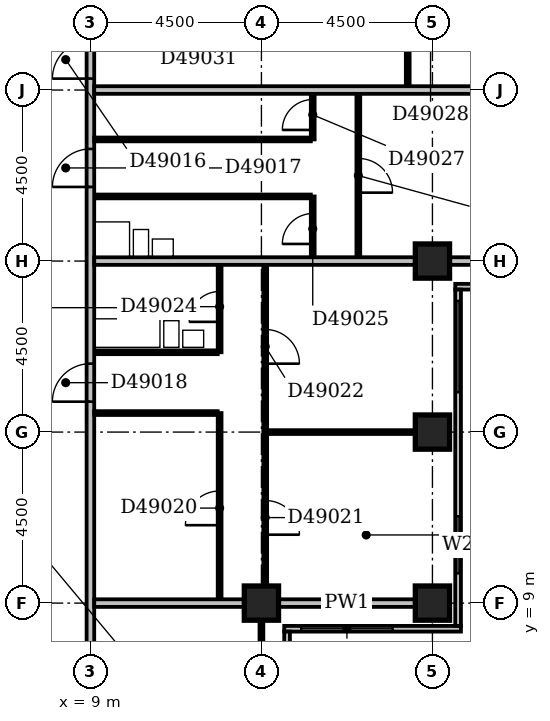
"""IFC4 building model, lengths in metres.
Left out: names, types, materials, properties, quantities, classifications, styles, units other than length and angle.
Written with IfcOpenShell. Run it as: python <this file> out.ifc"""

import sys

from ifc_helpers import new_model, si_unit, direction, frame, frame_2d, origin, origin_2d, place, context, subcontext, project, spatial, rectangle, extrude, element, fill, save


model = new_model("IFC4")
c1 = context("Model", 3, precision=1e-05, world=origin(), true_north=direction((0.0, 1.0)))
c2 = subcontext(c1, "Body", "Model", "MODEL_VIEW")
j1 = project(units=[si_unit("LENGTHUNIT", "METRE"), si_unit("PLANEANGLEUNIT", "RADIAN")], contexts=[c1])
p1 = place(None, origin())
s1 = spatial("IfcSite", under=j1, at=p1, CompositionType="ELEMENT")
p2 = place(p1, origin())
s2 = spatial("IfcBuilding", under=s1, at=p2, CompositionType="ELEMENT")
p3 = place(p2, frame((0.0, 0.0, 193.4)))
s3 = spatial("IfcBuildingStorey", under=s2, at=p3, CompositionType="ELEMENT", Elevation=193.4)
for number, where, z_axis, x_axis in (
    (1, (13.5, 9.0, -0.3), (0.0, 0.0, 1.0), (1.0, 0.0, 0.0)),
    (2, (18.0, 9.0, -0.3), (0.0, 0.0, 1.0), (1.0, 0.0, 0.0)),
    (3, (18.0, 13.5, -0.3), (0.0, 0.0, 1.0), (1.0, 0.0, 0.0)),
    (4, (18.0, 18.0, -0.3), (0.0, 0.0, 1.0), (1.0, 0.0, 0.0)),
):
    element("IfcColumn", number, at=place(p3, frame(where, z_axis=z_axis, x_axis=x_axis)), inside=s3, PredefinedType="COLUMN", context=c2, shape_type="SweptSolid", body=[
        extrude(rectangle(XDim=0.9, YDim=0.9, at=origin_2d()), origin(), (0.0, 0.0, 1.0), 3.6),
    ])
p4 = place(p3, frame((14.175, 3.9, 0.0), z_axis=(0.0, 0.0, 1.0), x_axis=(0.0, 1.0, 0.0)))
e5 = element("IfcWall", 5, at=p4, inside=s3, PredefinedType="STANDARD", context=c2, shape_type="SweptSolid", body=[
    extrude(rectangle(XDim=4.35, YDim=0.15, at=frame_2d((2.175, 0.0))), origin(), (0.0, 0.0, 1.0), 2.7),
])
p5 = place(p4, frame((1.65, 0.0, 0.6)))
e6 = element("IfcOpeningElement", 6, at=p5, cuts=e5, PredefinedType="OPENING", context=c2, shape_type="SweptSolid", body=[
    extrude(rectangle(XDim=2.4, YDim=1.8, at=frame_2d((1.2, 0.9))), frame((0.0, 0.087, 0.0), z_axis=(0.0, -1.0, 0.0), x_axis=(1.0, 0.0, 0.0)), (0.0, 0.0, 1.0), 0.174),
])
p6 = place(p3, frame((14.1, 8.325, 0.0), z_axis=(0.0, 0.0, 1.0), x_axis=(1.0, 0.0, 0.0)))
e7 = element("IfcWall", 7, at=p6, inside=s3, PredefinedType="STANDARD", context=c2, shape_type="SweptSolid", body=[
    extrude(rectangle(XDim=4.65, YDim=0.15, at=frame_2d((2.325, 0.0))), origin(), (0.0, 0.0, 1.0), 2.7),
])
p7 = place(p6, frame((0.45, 0.0, 0.6)))
e8 = element("IfcOpeningElement", 8, at=p7, cuts=e7, PredefinedType="OPENING", context=c2, shape_type="SweptSolid", body=[
    extrude(rectangle(XDim=2.4, YDim=1.8, at=frame_2d((1.2, 0.9))), frame((0.0, 0.087, 0.0), z_axis=(0.0, -1.0, 0.0), x_axis=(1.0, 0.0, 0.0)), (0.0, 0.0, 1.0), 0.174),
])
p8 = place(p3, frame((18.675, 8.4, 0.0), z_axis=(0.0, 0.0, 1.0), x_axis=(0.0, 1.0, 0.0)))
e9 = element("IfcWall", 9, at=p8, inside=s3, PredefinedType="STANDARD", context=c2, shape_type="SweptSolid", body=[
    extrude(rectangle(XDim=8.85, YDim=0.15, at=frame_2d((4.425, 0.0))), origin(), (0.0, 0.0, 1.0), 2.7),
])
p9 = place(p8, frame((1.384, 0.0, 0.6)))
e10 = element("IfcOpeningElement", 10, at=p9, cuts=e9, PredefinedType="OPENING", context=c2, shape_type="SweptSolid", body=[
    extrude(rectangle(XDim=1.5, YDim=1.8, at=frame_2d((0.75, 0.9))), frame((0.0, 0.087, 0.0), z_axis=(0.0, -1.0, 0.0), x_axis=(1.0, 0.0, 0.0)), (0.0, 0.0, 1.0), 0.174),
])
p10 = place(p8, frame((6.15, 0.0, 0.6)))
e11 = element("IfcOpeningElement", 11, at=p10, cuts=e9, PredefinedType="OPENING", context=c2, shape_type="SweptSolid", body=[
    extrude(rectangle(XDim=2.4, YDim=1.8, at=frame_2d((1.2, 0.9))), frame((0.0, 0.087, 0.0), z_axis=(0.0, -1.0, 0.0), x_axis=(1.0, 0.0, 0.0)), (0.0, 0.0, 1.0), 0.174),
])
p11 = place(p3, frame((18.6, 17.325, 0.0), z_axis=(0.0, 0.0, 1.0), x_axis=(1.0, 0.0, 0.0)))
e12 = element("IfcWall", 12, at=p11, inside=s3, PredefinedType="STANDARD", context=c2, shape_type="SweptSolid", body=[
    extrude(rectangle(XDim=4.65, YDim=0.15, at=frame_2d((2.325, 0.0))), origin(), (0.0, 0.0, 1.0), 2.7),
])
p12 = place(p11, frame((0.45, 0.0, 0.6)))
e13 = element("IfcOpeningElement", 13, at=p12, cuts=e12, PredefinedType="OPENING", context=c2, shape_type="SweptSolid", body=[
    extrude(rectangle(XDim=2.4, YDim=1.8, at=frame_2d((1.2, 0.9))), frame((0.0, 0.087, 0.0), z_axis=(0.0, -1.0, 0.0), x_axis=(1.0, 0.0, 0.0)), (0.0, 0.0, 1.0), 0.174),
])
p13 = place(p3, frame((13.5, 4.95, 0.0), z_axis=(0.0, 0.0, 1.0), x_axis=(0.0, 1.0, 0.0)))
e14 = element("IfcWall", 14, at=p13, inside=s3, PredefinedType="PARTITIONING", context=c2, shape_type="SweptSolid", body=[
    extrude(rectangle(XDim=3.6, YDim=0.1, at=frame_2d((1.8, 0.0))), origin(), (0.0, 0.0, 1.0), 2.7),
])
p14 = place(p3, frame((9.0, 5.0, 0.0), z_axis=(0.0, 0.0, 1.0), x_axis=(0.0, 1.0, 0.0)))
e15 = element("IfcWall", 15, at=p14, inside=s3, PredefinedType="PARTITIONING", context=c2, shape_type="SweptSolid", body=[
    extrude(rectangle(XDim=31.0, YDim=0.2, at=frame_2d((15.5, 0.0))), origin(), (0.0, 0.0, 1.0), 3.3),
])
p15 = place(p14, frame((17.8, 0.0, 0.0)))
e16 = element("IfcOpeningElement", 16, at=p15, cuts=e15, PredefinedType="OPENING", context=c2, shape_type="SweptSolid", body=[
    extrude(rectangle(XDim=1.0, YDim=2.1, at=frame_2d((0.5, 1.05))), frame((0.0, 0.112, 0.0), z_axis=(0.0, -1.0, 0.0), x_axis=(1.0, 0.0, 0.0)), (0.0, 0.0, 1.0), 0.224),
])
p16 = place(p14, frame((14.95, 0.0, 0.0)))
e17 = element("IfcOpeningElement", 17, at=p16, cuts=e15, PredefinedType="OPENING", context=c2, shape_type="SweptSolid", body=[
    extrude(rectangle(XDim=1.0, YDim=2.1, at=frame_2d((0.5, 1.05))), frame((0.0, 0.112, 0.0), z_axis=(0.0, -1.0, 0.0), x_axis=(1.0, 0.0, 0.0)), (0.0, 0.0, 1.0), 0.224),
])
p17 = place(p14, frame((9.3, 0.0, 0.0)))
e18 = element("IfcOpeningElement", 18, at=p17, cuts=e15, PredefinedType="OPENING", context=c2, shape_type="SweptSolid", body=[
    extrude(rectangle(XDim=1.0, YDim=2.1, at=frame_2d((0.5, 1.05))), frame((0.0, 0.112, 0.0), z_axis=(0.0, -1.0, 0.0), x_axis=(1.0, 0.0, 0.0)), (0.0, 0.0, 1.0), 0.224),
])
p18 = place(p14, frame((1.5, 0.0, 0.0)))
e19 = element("IfcOpeningElement", 19, at=p18, cuts=e15, PredefinedType="OPENING", context=c2, shape_type="SweptSolid", body=[
    extrude(rectangle(XDim=0.9, YDim=2.1, at=frame_2d((0.45, 1.05))), frame((0.0, 0.112, 0.0), z_axis=(0.0, -1.0, 0.0), x_axis=(1.0, 0.0, 0.0)), (0.0, 0.0, 1.0), 0.224),
])
p19 = place(p3, frame((9.1, 9.0, 0.0), z_axis=(0.0, 0.0, 1.0), x_axis=(1.0, 0.0, 0.0)))
e20 = element("IfcWall", 20, at=p19, inside=s3, PredefinedType="PARTITIONING", context=c2, shape_type="SweptSolid", body=[
    extrude(rectangle(XDim=3.95, YDim=0.2, at=frame_2d((1.975, 0.0))), origin(), (0.0, 0.0, 1.0), 3.3),
])
p20 = place(p3, frame((13.95, 9.0, 0.0), z_axis=(0.0, 0.0, 1.0), x_axis=(1.0, 0.0, 0.0)))
e21 = element("IfcWall", 21, at=p20, inside=s3, PredefinedType="PARTITIONING", context=c2, shape_type="SweptSolid", body=[
    extrude(rectangle(XDim=3.6, YDim=0.2, at=frame_2d((1.8, 0.0))), origin(), (0.0, 0.0, 1.0), 2.7),
])
p21 = place(p3, frame((12.4, 9.1, 0.0), z_axis=(0.0, 0.0, 1.0), x_axis=(0.0, 1.0, 0.0)))
e22 = element("IfcWall", 22, at=p21, inside=s3, PredefinedType="PARTITIONING", context=c2, shape_type="SweptSolid", body=[
    extrude(rectangle(XDim=4.9, YDim=0.1, at=frame_2d((2.45, 0.0))), origin(), (0.0, 0.0, 1.0), 3.3),
])
p22 = place(p21, frame((1.95, 0.0, 0.0)))
e23 = element("IfcOpeningElement", 23, at=p22, cuts=e22, PredefinedType="OPENING", context=c2, shape_type="SweptSolid", body=[
    extrude(rectangle(XDim=0.9, YDim=2.1, at=frame_2d((0.45, 1.05))), frame((0.0, 0.062, 0.0), z_axis=(0.0, -1.0, 0.0), x_axis=(1.0, 0.0, 0.0)), (0.0, 0.0, 1.0), 0.124),
])
p23 = place(p3, frame((13.6, 9.45, 0.0), z_axis=(0.0, 0.0, 1.0), x_axis=(0.0, 1.0, 0.0)))
e24 = element("IfcWall", 24, at=p23, inside=s3, PredefinedType="PARTITIONING", context=c2, shape_type="SweptSolid", body=[
    extrude(rectangle(XDim=8.45, YDim=0.1, at=frame_2d((4.225, 0.0))), origin(), (0.0, 0.0, 1.0), 3.3),
])
p24 = place(p23, frame((1.35, 0.0, 0.0)))
e25 = element("IfcOpeningElement", 25, at=p24, cuts=e24, PredefinedType="OPENING", context=c2, shape_type="SweptSolid", body=[
    extrude(rectangle(XDim=0.9, YDim=2.1, at=frame_2d((0.45, 1.05))), frame((0.0, 0.062, 0.0), z_axis=(0.0, -1.0, 0.0), x_axis=(1.0, 0.0, 0.0)), (0.0, 0.0, 1.0), 0.124),
])
p25 = place(p23, frame((5.85, 0.0, 0.0)))
e26 = element("IfcOpeningElement", 26, at=p25, cuts=e24, PredefinedType="OPENING", context=c2, shape_type="SweptSolid", body=[
    extrude(rectangle(XDim=0.9, YDim=2.1, at=frame_2d((0.45, 1.05))), frame((0.0, 0.062, 0.0), z_axis=(0.0, -1.0, 0.0), x_axis=(1.0, 0.0, 0.0)), (0.0, 0.0, 1.0), 0.124),
])
p26 = place(p3, frame((13.65, 13.5, 0.0), z_axis=(0.0, 0.0, 1.0), x_axis=(1.0, 0.0, 0.0)))
e27 = element("IfcWall", 27, at=p26, inside=s3, PredefinedType="PARTITIONING", context=c2, shape_type="SweptSolid", body=[
    extrude(rectangle(XDim=3.9, YDim=0.1, at=frame_2d((1.95, 0.0))), origin(), (0.0, 0.0, 1.0), 3.3),
])
p27 = place(p3, frame((9.1, 14.0, 0.0), z_axis=(0.0, 0.0, 1.0), x_axis=(1.0, 0.0, 0.0)))
e28 = element("IfcWall", 28, at=p27, inside=s3, PredefinedType="PARTITIONING", context=c2, shape_type="SweptSolid", body=[
    extrude(rectangle(XDim=3.25, YDim=0.1, at=frame_2d((1.625, 0.0))), origin(), (0.0, 0.0, 1.0), 3.3),
])
p28 = place(p3, frame((9.1, 15.6, 0.0), z_axis=(0.0, 0.0, 1.0), x_axis=(1.0, 0.0, 0.0)))
e29 = element("IfcWall", 29, at=p28, inside=s3, PredefinedType="PLUMBINGWALL", context=c2, shape_type="SweptSolid", body=[
    extrude(rectangle(XDim=3.25, YDim=0.1, at=frame_2d((1.625, 0.0))), origin(), (0.0, 0.0, 1.0), 3.3),
])
p29 = place(p3, frame((12.4, 15.6, 0.0), z_axis=(0.0, 0.0, 1.0), x_axis=(0.0, 1.0, 0.0)))
e30 = element("IfcWall", 30, at=p29, inside=s3, PredefinedType="PARTITIONING", context=c2, shape_type="SweptSolid", body=[
    extrude(rectangle(XDim=2.3, YDim=0.1, at=frame_2d((1.15, 0.0))), origin(), (0.0, 0.0, 1.0), 3.3),
])
p30 = place(p29, frame((0.8, 0.0, 0.0)))
e31 = element("IfcOpeningElement", 31, at=p30, cuts=e30, PredefinedType="OPENING", context=c2, shape_type="SweptSolid", body=[
    extrude(rectangle(XDim=0.8, YDim=2.1, at=frame_2d((0.4, 1.05))), frame((0.0, 0.062, 0.0), z_axis=(0.0, -1.0, 0.0), x_axis=(1.0, 0.0, 0.0)), (0.0, 0.0, 1.0), 0.124),
])
p31 = place(p3, frame((9.1, 18.0, 0.0), z_axis=(0.0, 0.0, 1.0), x_axis=(1.0, 0.0, 0.0)))
e32 = element("IfcWall", 32, at=p31, inside=s3, PredefinedType="PARTITIONING", context=c2, shape_type="SweptSolid", body=[
    extrude(rectangle(XDim=8.45, YDim=0.2, at=frame_2d((4.225, 0.0))), origin(), (0.0, 0.0, 1.0), 2.6),
])
p32 = place(p3, frame((18.45, 18.0, 0.0), z_axis=(0.0, 0.0, 1.0), x_axis=(1.0, 0.0, 0.0)))
e33 = element("IfcWall", 33, at=p32, inside=s3, PredefinedType="PARTITIONING", context=c2, shape_type="SweptSolid", body=[
    extrude(rectangle(XDim=3.6, YDim=0.2, at=frame_2d((1.8, 0.0))), origin(), (0.0, 0.0, 1.0), 2.7),
])
p33 = place(p3, frame((14.85, 18.1, 0.0), z_axis=(0.0, 0.0, 1.0), x_axis=(0.0, 1.0, 0.0)))
e34 = element("IfcWall", 34, at=p33, inside=s3, PredefinedType="PARTITIONING", context=c2, shape_type="SweptSolid", body=[
    extrude(rectangle(XDim=1.6, YDim=0.1, at=frame_2d((0.8, 0.0))), origin(), (0.0, 0.0, 1.0), 3.3),
])
p34 = place(p33, frame((0.35, 0.0, 0.0)))
e35 = element("IfcOpeningElement", 35, at=p34, cuts=e34, PredefinedType="OPENING", context=c2, shape_type="SweptSolid", body=[
    extrude(rectangle(XDim=0.8, YDim=2.1, at=frame_2d((0.4, 1.05))), frame((0.0, 0.062, 0.0), z_axis=(0.0, -1.0, 0.0), x_axis=(1.0, 0.0, 0.0)), (0.0, 0.0, 1.0), 0.124),
])
p35 = place(p3, frame((16.05, 18.1, 0.0), z_axis=(0.0, 0.0, 1.0), x_axis=(0.0, 1.0, 0.0)))
e36 = element("IfcWall", 36, at=p35, inside=s3, PredefinedType="PARTITIONING", context=c2, shape_type="SweptSolid", body=[
    extrude(rectangle(XDim=4.3, YDim=0.1, at=frame_2d((2.15, 0.0))), origin(), (0.0, 0.0, 1.0), 3.3),
])
p36 = place(p35, frame((1.7, 0.0, 0.0)))
e37 = element("IfcOpeningElement", 37, at=p36, cuts=e36, PredefinedType="OPENING", context=c2, shape_type="SweptSolid", body=[
    extrude(rectangle(XDim=0.9, YDim=2.1, at=frame_2d((0.45, 1.05))), frame((0.0, 0.062, 0.0), z_axis=(0.0, -1.0, 0.0), x_axis=(1.0, 0.0, 0.0)), (0.0, 0.0, 1.0), 0.124),
])
p37 = place(p3, frame((9.1, 19.7, 0.0), z_axis=(0.0, 0.0, 1.0), x_axis=(1.0, 0.0, 0.0)))
e38 = element("IfcWall", 38, at=p37, inside=s3, PredefinedType="PLUMBINGWALL", context=c2, shape_type="SweptSolid", body=[
    extrude(rectangle(XDim=5.7, YDim=0.1, at=frame_2d((2.85, 0.0))), origin(), (0.0, 0.0, 1.0), 3.3),
])
p38 = place(p3, frame((9.1, 21.2, 0.0), z_axis=(0.0, 0.0, 1.0), x_axis=(1.0, 0.0, 0.0)))
e39 = element("IfcWall", 39, at=p38, inside=s3, PredefinedType="PARTITIONING", context=c2, shape_type="SweptSolid", body=[
    extrude(rectangle(XDim=5.7, YDim=0.1, at=frame_2d((2.85, 0.0))), origin(), (0.0, 0.0, 1.0), 3.3),
])
p39 = place(p3, frame((14.85, 21.2, 0.0), z_axis=(0.0, 0.0, 1.0), x_axis=(0.0, 1.0, 0.0)))
e40 = element("IfcWall", 40, at=p39, inside=s3, PredefinedType="PARTITIONING", context=c2, shape_type="SweptSolid", body=[
    extrude(rectangle(XDim=1.2, YDim=0.1, at=frame_2d((0.6, 0.0))), origin(), (0.0, 0.0, 1.0), 3.3),
])
p40 = place(p39, frame((0.25, 0.0, 0.0)))
e41 = element("IfcOpeningElement", 41, at=p40, cuts=e40, PredefinedType="OPENING", context=c2, shape_type="SweptSolid", body=[
    extrude(rectangle(XDim=0.8, YDim=2.1, at=frame_2d((0.4, 1.05))), frame((0.0, 0.062, 0.0), z_axis=(0.0, -1.0, 0.0), x_axis=(1.0, 0.0, 0.0)), (0.0, 0.0, 1.0), 0.124),
])
p41 = place(p3, frame((9.1, 22.5, 0.0), z_axis=(0.0, 0.0, 1.0), x_axis=(1.0, 0.0, 0.0)))
e42 = element("IfcWall", 42, at=p41, inside=s3, PredefinedType="PARTITIONING", context=c2, shape_type="SweptSolid", body=[
    extrude(rectangle(XDim=12.95, YDim=0.2, at=frame_2d((6.475, 0.0))), origin(), (0.0, 0.0, 1.0), 3.3),
])
p42 = place(p3, frame((17.35, 22.6, 0.0), z_axis=(0.0, 0.0, 1.0), x_axis=(0.0, 1.0, 0.0)))
e43 = element("IfcWall", 43, at=p42, inside=s3, PredefinedType="PARTITIONING", context=c2, shape_type="SweptSolid", body=[
    extrude(rectangle(XDim=13.3, YDim=0.1, at=frame_2d((6.65, 0.0))), origin(), (0.0, 0.0, 1.0), 3.3),
])
p43 = place(p42, frame((1.7, 0.0, 0.0)))
e44 = element("IfcOpeningElement", 44, at=p43, cuts=e43, PredefinedType="OPENING", context=c2, shape_type="SweptSolid", body=[
    extrude(rectangle(XDim=0.9, YDim=2.1, at=frame_2d((0.45, 1.05))), frame((0.0, 0.062, 0.0), z_axis=(0.0, -1.0, 0.0), x_axis=(1.0, 0.0, 0.0)), (0.0, 0.0, 1.0), 0.124),
])
p44 = place(p42, frame((7.35, 0.0, 0.0)))
e45 = element("IfcOpeningElement", 45, at=p44, cuts=e43, PredefinedType="OPENING", context=c2, shape_type="SweptSolid", body=[
    extrude(rectangle(XDim=0.9, YDim=2.1, at=frame_2d((0.45, 1.05))), frame((0.0, 0.062, 0.0), z_axis=(0.0, -1.0, 0.0), x_axis=(1.0, 0.0, 0.0)), (0.0, 0.0, 1.0), 0.124),
])
p45 = place(p42, frame((10.7, 0.0, 0.0)))
e46 = element("IfcOpeningElement", 46, at=p45, cuts=e43, PredefinedType="OPENING", context=c2, shape_type="SweptSolid", body=[
    extrude(rectangle(XDim=0.9, YDim=2.1, at=frame_2d((0.45, 1.05))), frame((0.0, 0.062, 0.0), z_axis=(0.0, -1.0, 0.0), x_axis=(1.0, 0.0, 0.0)), (0.0, 0.0, 1.0), 0.124),
])
p46 = place(p7, origin())
e47 = element("IfcWindow", 47, at=p46, inside=s3, PartitioningType="SINGLE_PANEL", PredefinedType="WINDOW", context=c2, shape_type="SweptSolid", body=[
    extrude(rectangle(XDim=2.4, YDim=1.8, at=frame_2d((1.2, 0.9))), frame((0.0, 0.03, 0.0), z_axis=(0.0, -1.0, 0.0), x_axis=(1.0, 0.0, 0.0)), (0.0, 0.0, 1.0), 0.06),
])
fill(e8, e47)
p47 = place(p9, origin())
e48 = element("IfcWindow", 48, at=p47, inside=s3, PartitioningType="SINGLE_PANEL", PredefinedType="WINDOW", context=c2, shape_type="SweptSolid", body=[
    extrude(rectangle(XDim=1.5, YDim=1.8, at=frame_2d((0.75, 0.9))), frame((0.0, 0.03, 0.0), z_axis=(0.0, -1.0, 0.0), x_axis=(1.0, 0.0, 0.0)), (0.0, 0.0, 1.0), 0.06),
])
fill(e10, e48)
p48 = place(p10, origin())
e49 = element("IfcWindow", 49, at=p48, inside=s3, PartitioningType="SINGLE_PANEL", PredefinedType="WINDOW", context=c2, shape_type="SweptSolid", body=[
    extrude(rectangle(XDim=2.4, YDim=1.8, at=frame_2d((1.2, 0.9))), frame((0.0, 0.03, 0.0), z_axis=(0.0, -1.0, 0.0), x_axis=(1.0, 0.0, 0.0)), (0.0, 0.0, 1.0), 0.06),
])
fill(e11, e49)
p49 = place(p15, origin())
e50 = element("IfcDoor", 50, at=p49, inside=s3, OperationType="SINGLE_SWING_LEFT", PredefinedType="DOOR", context=c2, shape_type="SweptSolid", body=[
    extrude(rectangle(XDim=1.0, YDim=2.1, at=frame_2d((0.5, 1.05))), frame((0.0, 0.025, 0.0), z_axis=(0.0, -1.0, 0.0), x_axis=(1.0, 0.0, 0.0)), (0.0, 0.0, 1.0), 0.05),
])
fill(e16, e50)
p50 = place(p16, origin())
e51 = element("IfcDoor", 51, at=p50, inside=s3, OperationType="SINGLE_SWING_LEFT", PredefinedType="DOOR", context=c2, shape_type="SweptSolid", body=[
    extrude(rectangle(XDim=1.0, YDim=2.1, at=frame_2d((0.5, 1.05))), frame((0.0, 0.025, 0.0), z_axis=(0.0, -1.0, 0.0), x_axis=(1.0, 0.0, 0.0)), (0.0, 0.0, 1.0), 0.05),
])
fill(e17, e51)
p51 = place(p17, origin())
e52 = element("IfcDoor", 52, at=p51, inside=s3, OperationType="SINGLE_SWING_LEFT", PredefinedType="DOOR", context=c2, shape_type="SweptSolid", body=[
    extrude(rectangle(XDim=1.0, YDim=2.1, at=frame_2d((0.5, 1.05))), frame((0.0, 0.025, 0.0), z_axis=(0.0, -1.0, 0.0), x_axis=(1.0, 0.0, 0.0)), (0.0, 0.0, 1.0), 0.05),
])
fill(e18, e52)
p52 = place(p22, origin())
e53 = element("IfcDoor", 53, at=p52, inside=s3, OperationType="SINGLE_SWING_LEFT", PredefinedType="DOOR", context=c2, shape_type="SweptSolid", body=[
    extrude(rectangle(XDim=0.9, YDim=2.1, at=frame_2d((0.45, 1.05))), frame((0.0, 0.025, 0.0), z_axis=(0.0, -1.0, 0.0), x_axis=(1.0, 0.0, 0.0)), (0.0, 0.0, 1.0), 0.05),
])
fill(e23, e53)
p53 = place(p24, frame((0.9, 0.0, 0.0), z_axis=(0.0, 0.0, 1.0), x_axis=(-1.0, 0.0, 0.0)))
e54 = element("IfcDoor", 54, at=p53, inside=s3, OperationType="SINGLE_SWING_RIGHT", PredefinedType="DOOR", context=c2, shape_type="SweptSolid", body=[
    extrude(rectangle(XDim=0.9, YDim=2.1, at=frame_2d((0.45, 1.05))), frame((0.0, 0.025, 0.0), z_axis=(0.0, -1.0, 0.0), x_axis=(1.0, 0.0, 0.0)), (0.0, 0.0, 1.0), 0.05),
])
fill(e25, e54)
p54 = place(p25, frame((0.9, 0.0, 0.0), z_axis=(0.0, 0.0, 1.0), x_axis=(-1.0, 0.0, 0.0)))
e55 = element("IfcDoor", 55, at=p54, inside=s3, OperationType="SINGLE_SWING_RIGHT", PredefinedType="DOOR", context=c2, shape_type="SweptSolid", body=[
    extrude(rectangle(XDim=0.9, YDim=2.1, at=frame_2d((0.45, 1.05))), frame((0.0, 0.025, 0.0), z_axis=(0.0, -1.0, 0.0), x_axis=(1.0, 0.0, 0.0)), (0.0, 0.0, 1.0), 0.05),
])
fill(e26, e55)
p55 = place(p30, origin())
e56 = element("IfcDoor", 56, at=p55, inside=s3, OperationType="SINGLE_SWING_LEFT", PredefinedType="DOOR", context=c2, shape_type="SweptSolid", body=[
    extrude(rectangle(XDim=0.8, YDim=2.1, at=frame_2d((0.4, 1.05))), frame((0.0, 0.025, 0.0), z_axis=(0.0, -1.0, 0.0), x_axis=(1.0, 0.0, 0.0)), (0.0, 0.0, 1.0), 0.05),
])
fill(e31, e56)
p56 = place(p34, origin())
e57 = element("IfcDoor", 57, at=p56, inside=s3, OperationType="SINGLE_SWING_LEFT", PredefinedType="DOOR", context=c2, shape_type="SweptSolid", body=[
    extrude(rectangle(XDim=0.8, YDim=2.1, at=frame_2d((0.4, 1.05))), frame((0.0, 0.025, 0.0), z_axis=(0.0, -1.0, 0.0), x_axis=(1.0, 0.0, 0.0)), (0.0, 0.0, 1.0), 0.05),
])
fill(e35, e57)
p57 = place(p36, frame((0.9, 0.0, 0.0), z_axis=(0.0, 0.0, 1.0), x_axis=(-1.0, 0.0, 0.0)))
e58 = element("IfcDoor", 58, at=p57, inside=s3, OperationType="SINGLE_SWING_RIGHT", PredefinedType="DOOR", context=c2, shape_type="SweptSolid", body=[
    extrude(rectangle(XDim=0.9, YDim=2.1, at=frame_2d((0.45, 1.05))), frame((0.0, 0.025, 0.0), z_axis=(0.0, -1.0, 0.0), x_axis=(1.0, 0.0, 0.0)), (0.0, 0.0, 1.0), 0.05),
])
fill(e37, e58)
p58 = place(p40, origin())
e59 = element("IfcDoor", 59, at=p58, inside=s3, OperationType="SINGLE_SWING_LEFT", PredefinedType="DOOR", context=c2, shape_type="SweptSolid", body=[
    extrude(rectangle(XDim=0.8, YDim=2.1, at=frame_2d((0.4, 1.05))), frame((0.0, 0.025, 0.0), z_axis=(0.0, -1.0, 0.0), x_axis=(1.0, 0.0, 0.0)), (0.0, 0.0, 1.0), 0.05),
])
fill(e41, e59)
save(model, sys.argv[1])
